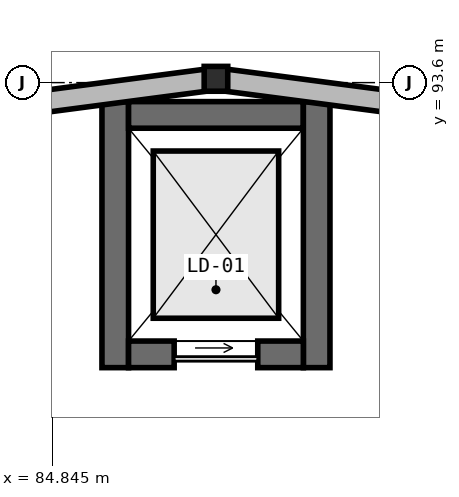
"""IFC4 building model, lengths in metres.
Left out: names, types, materials, properties, quantities, classifications, styles, units other than length and angle.
Written with IfcOpenShell. Run it as: python <this file> out.ifc"""

import sys

from ifc_helpers import new_model, si_unit, direction, frame, frame_2d, origin, origin_2d, place, context, subcontext, project, spatial, rectangle, i_section, extrude, element, fill, save


model = new_model("IFC4")
c1 = context("Model", 3, precision=1e-05, world=origin(), true_north=direction((0.0, 1.0)))
c2 = subcontext(c1, "Body", "Model", "MODEL_VIEW")
j1 = project(units=[si_unit("LENGTHUNIT", "METRE"), si_unit("PLANEANGLEUNIT", "RADIAN")], contexts=[c1])
p1 = place(None, origin())
s1 = spatial("IfcSite", under=j1, at=p1, CompositionType="ELEMENT")
p2 = place(p1, origin())
s2 = spatial("IfcBuilding", under=s1, at=p2, CompositionType="ELEMENT")
p3 = place(p2, frame((0.0, 0.0, 5.25)))
s3 = spatial("IfcBuildingStorey", under=s2, at=p3, CompositionType="ELEMENT", Elevation=5.25)
p4 = place(p3, frame((85.675, 89.85, 0.0), z_axis=(0.0, 0.0, 1.0), x_axis=(0.0, 1.0, 0.0)))
e1 = element("IfcWall", 1, at=p4, inside=s3, PredefinedType="SHEAR", context=c2, shape_type="SweptSolid", body=[
    extrude(rectangle(XDim=3.5, YDim=0.35, at=frame_2d((1.75, 0.0))), origin(), (0.0, 0.0, 1.0), 4.55),
])
p5 = place(p3, frame((85.85, 93.175, 0.0), z_axis=(0.0, 0.0, 1.0), x_axis=(1.0, 0.0, 0.0)))
e2 = element("IfcWall", 2, at=p5, inside=s3, PredefinedType="SHEAR", context=c2, shape_type="SweptSolid", body=[
    extrude(rectangle(XDim=2.3, YDim=0.35, at=frame_2d((1.15, 0.0))), origin(), (0.0, 0.0, 1.0), 4.55),
])
p6 = place(p3, frame((88.325, 93.35, 0.0), z_axis=(0.0, 0.0, 1.0), x_axis=(0.0, -1.0, 0.0)))
e3 = element("IfcWall", 3, at=p6, inside=s3, PredefinedType="SHEAR", context=c2, shape_type="SweptSolid", body=[
    extrude(rectangle(XDim=3.5, YDim=0.35, at=frame_2d((1.75, 0.0))), origin(), (0.0, 0.0, 1.0), 4.55),
])
p7 = place(p3, frame((88.15, 90.025, 0.0), z_axis=(0.0, 0.0, 1.0), x_axis=(-1.0, 0.0, 0.0)))
e4 = element("IfcWall", 4, at=p7, inside=s3, PredefinedType="SHEAR", context=c2, shape_type="SweptSolid", body=[
    extrude(rectangle(XDim=2.3, YDim=0.35, at=frame_2d((1.15, 0.0))), origin(), (0.0, 0.0, 1.0), 4.55),
])
p8 = place(p7, frame((0.6, 0.0, 0.0)))
e5 = element("IfcOpeningElement", 5, at=p8, cuts=e4, PredefinedType="OPENING", context=c2, shape_type="SweptSolid", body=[
    extrude(rectangle(XDim=1.1, YDim=2.15, at=frame_2d((0.55, 1.075))), frame((0.0, 0.185, 0.0), z_axis=(0.0, -1.0, 0.0), x_axis=(1.0, 0.0, 0.0)), (0.0, 0.0, 1.0), 0.37),
])
p9 = place(p3, frame((87.0, 93.65, 0.0), z_axis=(0.0, 0.0, 1.0), x_axis=(1.0, 0.0, 0.0)))
e6 = element("IfcColumn", 6, at=p9, inside=s3, PredefinedType="COLUMN", context=c2, shape_type="SweptSolid", body=[
    extrude(i_section(OverallWidth=0.31, OverallDepth=0.327, WebThickness=0.016, FlangeThickness=0.025, at=origin_2d()), origin(), (0.0, 0.0, 1.0), 4.55),
])
p10 = place(p3, frame((97.0, 93.344, 0.0), z_axis=(0.0, 0.0, 1.0), x_axis=(-0.991454872597, 0.130450126879, 0.0)))
e7 = element("IfcWall", 7, at=p10, inside=s3, PredefinedType="SOLIDWALL", context=c2, shape_type="SweptSolid", body=[
    extrude(rectangle(XDim=10.08, YDim=0.29, at=frame_2d((5.04, 0.0))), origin(), (0.0, 0.0, 1.0), 3.732),
])
p11 = place(p10, frame((3.855, 0.0, 0.95)))
e8 = element("IfcOpeningElement", 8, at=p11, cuts=e7, PredefinedType="OPENING", context=c2, shape_type="SweptSolid", body=[
    extrude(rectangle(XDim=2.37, YDim=1.59, at=frame_2d((1.185, 0.795))), frame((0.0, 0.155, 0.0), z_axis=(0.0, -1.0, 0.0), x_axis=(1.0, 0.0, 0.0)), (0.0, 0.0, 1.0), 0.31),
])
p12 = place(p3, frame((86.994, 94.659, 0.0), z_axis=(0.0, 0.0, 1.0), x_axis=(-0.991454872597, -0.130450126879, 0.0)))
e9 = element("IfcWall", 9, at=p12, inside=s3, PredefinedType="SOLIDWALL", context=c2, shape_type="SweptSolid", body=[
    extrude(rectangle(XDim=10.08, YDim=0.29, at=frame_2d((5.04, 0.0))), origin(), (0.0, 0.0, 1.0), 3.732),
])
p13 = place(p12, frame((3.69, 0.0, 0.95)))
e10 = element("IfcOpeningElement", 10, at=p13, cuts=e9, PredefinedType="OPENING", context=c2, shape_type="SweptSolid", body=[
    extrude(rectangle(XDim=2.7, YDim=1.51, at=frame_2d((1.35, 0.755))), frame((0.0, 0.155, 0.0), z_axis=(0.0, -1.0, 0.0), x_axis=(1.0, 0.0, 0.0)), (0.0, 0.0, 1.0), 0.31),
])
p14 = place(p3, frame((87.004, 93.649, 0.0), z_axis=(0.0, 0.0, 1.0), x_axis=(0.991456749128, -0.130435863969, 0.0)))
e11 = element("IfcWall", 11, at=p14, inside=s3, PredefinedType="SOLIDWALL", context=c2, shape_type="SweptSolid", body=[
    extrude(rectangle(XDim=9.821, YDim=0.29, at=frame_2d((4.911, 0.0))), origin(), (0.0, 0.0, 1.0), 3.815),
])
p15 = place(p14, frame((6.566, 0.0, 0.95)))
e12 = element("IfcOpeningElement", 12, at=p15, cuts=e11, PredefinedType="OPENING", context=c2, shape_type="SweptSolid", body=[
    extrude(rectangle(XDim=1.6, YDim=1.4, at=frame_2d((0.8, 0.7))), frame((0.0, 0.155, 0.0), z_axis=(0.0, -1.0, 0.0), x_axis=(1.0, 0.0, 0.0)), (0.0, 0.0, 1.0), 0.31),
])
p16 = place(p3, frame((77.259, 92.368, 0.0), z_axis=(0.0, 0.0, 1.0), x_axis=(0.991456749128, 0.130435863969, 0.0)))
e13 = element("IfcWall", 13, at=p16, inside=s3, PredefinedType="SOLIDWALL", context=c2, shape_type="SweptSolid", body=[
    extrude(rectangle(XDim=9.821, YDim=0.29, at=frame_2d((4.911, 0.0))), origin(), (0.0, 0.0, 1.0), 3.815),
])
p17 = place(p16, frame((1.49, 0.0, 0.95)))
e14 = element("IfcOpeningElement", 14, at=p17, cuts=e13, PredefinedType="OPENING", context=c2, shape_type="SweptSolid", body=[
    extrude(rectangle(XDim=1.93, YDim=1.8, at=frame_2d((0.965, 0.9))), frame((0.0, 0.155, 0.0), z_axis=(0.0, -1.0, 0.0), x_axis=(1.0, 0.0, 0.0)), (0.0, 0.0, 1.0), 0.31),
])
p18 = place(p8, origin())
e15 = element("IfcDoor", 15, at=p18, inside=s3, OperationType="SLIDING_TO_LEFT", PredefinedType="USERDEFINED", context=c2, shape_type="SweptSolid", body=[
    extrude(rectangle(XDim=1.1, YDim=2.15, at=frame_2d((0.55, 1.075))), frame((0.0, 0.025, 0.0), z_axis=(0.0, -1.0, 0.0), x_axis=(1.0, 0.0, 0.0)), (0.0, 0.0, 1.0), 0.05),
])
fill(e5, e15)
save(model, sys.argv[1])
